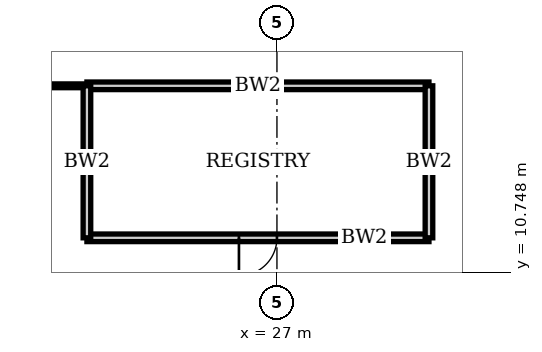
"""IFC4 building model, lengths in metres.
Left out: names, types, materials, properties, quantities, classifications, styles, units other than length and angle.
Written with IfcOpenShell. Run it as: python <this file> out.ifc"""

import sys

from ifc_helpers import new_model, si_unit, direction, frame, frame_2d, origin, place, context, subcontext, project, spatial, rectangle, extrude, element, fill, save


model = new_model("IFC4")
c1 = context("Model", 3, precision=1e-05, world=origin(), true_north=direction((0.0, 1.0)))
c2 = subcontext(c1, "Body", "Model", "MODEL_VIEW")
j1 = project(units=[si_unit("LENGTHUNIT", "METRE"), si_unit("PLANEANGLEUNIT", "RADIAN")], contexts=[c1])
p1 = place(None, origin())
s1 = spatial("IfcSite", under=j1, at=p1, CompositionType="ELEMENT")
p2 = place(p1, origin())
s2 = spatial("IfcBuilding", under=s1, at=p2, CompositionType="ELEMENT")
p3 = place(p2, frame((0.0, 0.0, 27.8)))
s3 = spatial("IfcBuildingStorey", under=s2, at=p3, CompositionType="ELEMENT", Elevation=27.8)
p4 = place(p3, frame((22.0, 11.65, 0.0), z_axis=(0.0, 0.0, 1.0), x_axis=(1.0, 0.0, 0.0)))
e1 = element("IfcWall", 1, at=p4, inside=s3, PredefinedType="SOLIDWALL", context=c2, shape_type="SweptSolid", body=[
    extrude(rectangle(XDim=9.0, YDim=0.2, at=frame_2d((4.5, 0.0))), origin(), (0.0, 0.0, 1.0), 3.75),
])
p5 = place(p4, frame((4.0, 0.0, 0.0)))
e2 = element("IfcOpeningElement", 2, at=p5, cuts=e1, PredefinedType="OPENING", context=c2, shape_type="SweptSolid", body=[
    extrude(rectangle(XDim=1.0, YDim=2.4, at=frame_2d((0.5, 1.2))), frame((0.0, 0.11, 0.0), z_axis=(0.0, -1.0, 0.0), x_axis=(1.0, 0.0, 0.0)), (0.0, 0.0, 1.0), 0.22),
])
p6 = place(p3, frame((22.0, 15.65, 0.0), z_axis=(0.0, 0.0, 1.0), x_axis=(1.0, 0.0, 0.0)))
e3 = element("IfcWall", 3, at=p6, inside=s3, PredefinedType="SOLIDWALL", context=c2, shape_type="SweptSolid", body=[
    extrude(rectangle(XDim=9.0, YDim=0.2, at=frame_2d((4.5, 0.0))), origin(), (0.0, 0.0, 1.0), 3.75),
])
p7 = place(p3, frame((18.0, 15.65, 0.0), z_axis=(0.0, 0.0, 1.0), x_axis=(1.0, 0.0, 0.0)))
e4 = element("IfcWall", 4, at=p7, inside=s3, PredefinedType="PARTITIONING", context=c2, shape_type="SweptSolid", body=[
    extrude(rectangle(XDim=4.0, YDim=0.1, at=frame_2d((2.0, 0.0))), origin(), (0.0, 0.0, 1.0), 3.75),
])
for number, where, z_axis, x_axis in (
    (5, (22.0, 11.65, 0.0), (0.0, 0.0, 1.0), (0.0, 1.0, 0.0)),
    (6, (31.0, 11.65, 0.0), (0.0, 0.0, 1.0), (0.0, 1.0, 0.0)),
):
    element("IfcWall", number, at=place(p3, frame(where, z_axis=z_axis, x_axis=x_axis)), inside=s3, PredefinedType="SOLIDWALL", context=c2, shape_type="SweptSolid", body=[
        extrude(rectangle(XDim=4.0, YDim=0.2, at=frame_2d((2.0, 0.0))), origin(), (0.0, 0.0, 1.0), 3.75),
    ])
p8 = place(p5, origin())
e7 = element("IfcDoor", 7, at=p8, inside=s3, OperationType="SINGLE_SWING_LEFT", PredefinedType="DOOR", context=c2, shape_type="SweptSolid", body=[
    extrude(rectangle(XDim=1.0, YDim=2.4, at=frame_2d((0.5, 1.2))), frame((0.0, 0.035, 0.0), z_axis=(0.0, -1.0, 0.0), x_axis=(1.0, 0.0, 0.0)), (0.0, 0.0, 1.0), 0.07),
])
fill(e2, e7)
save(model, sys.argv[1])
